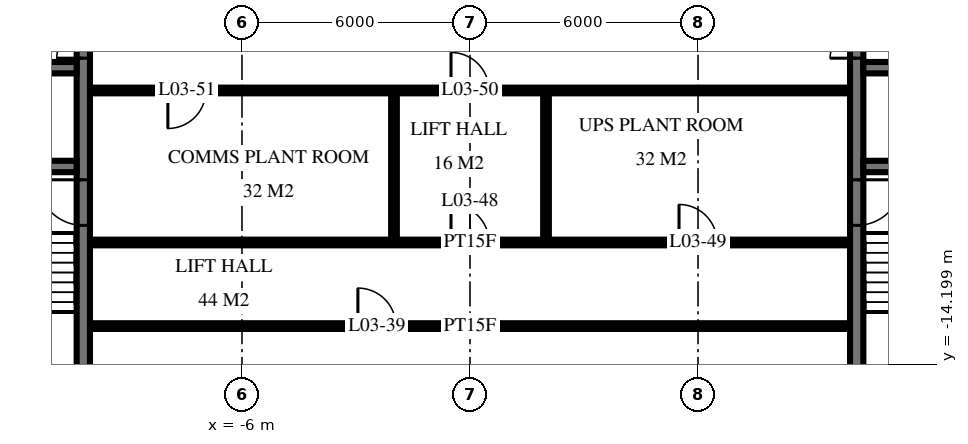
"""IFC4 building model, lengths in metres.
Left out: names, types, materials, properties, quantities, classifications, styles, units other than length and angle.
Written with IfcOpenShell. Run it as: python <this file> out.ifc"""

import sys

from ifc_helpers import new_model, si_unit, direction, frame, frame_2d, origin, place, context, subcontext, project, spatial, rectangle, extrude, element, fill, save


model = new_model("IFC4")
c1 = context("Model", 3, precision=1e-05, world=origin(), true_north=direction((0.0, 1.0)))
c2 = subcontext(c1, "Body", "Model", "MODEL_VIEW")
j1 = project(units=[si_unit("LENGTHUNIT", "METRE"), si_unit("PLANEANGLEUNIT", "RADIAN")], contexts=[c1])
p1 = place(None, origin())
s1 = spatial("IfcSite", under=j1, at=p1, CompositionType="ELEMENT")
p2 = place(p1, origin())
s2 = spatial("IfcBuilding", under=s1, at=p2, CompositionType="ELEMENT")
p3 = place(p2, frame((0.0, 0.0, 18.0)))
s3 = spatial("IfcBuildingStorey", under=s2, at=p3, CompositionType="ELEMENT", Elevation=18.0)
p4 = place(p3, frame((-10.175, -14.55, 0.0), z_axis=(0.0, 0.0, 1.0), x_axis=(0.0, 1.0, 0.0)))
e1 = element("IfcWall", 1, at=p4, inside=s3, PredefinedType="SHEAR", context=c2, shape_type="SweptSolid", body=[
    extrude(rectangle(XDim=14.1, YDim=0.35, at=frame_2d((7.05, 0.0))), origin(), (0.0, 0.0, 1.0), 6.0),
])
p5 = place(p4, frame((8.4, 0.0, 0.0)))
e2 = element("IfcOpeningElement", 2, at=p5, cuts=e1, PredefinedType="OPENING", context=c2, shape_type="SweptSolid", body=[
    extrude(rectangle(XDim=1.4, YDim=2.4, at=frame_2d((0.7, 1.2))), frame((0.0, 0.185, 0.0), z_axis=(0.0, -1.0, 0.0), x_axis=(1.0, 0.0, 0.0)), (0.0, 0.0, 1.0), 0.37),
])
p6 = place(p4, frame((10.0, 0.0, 0.0)))
e3 = element("IfcOpeningElement", 3, at=p6, cuts=e1, PredefinedType="OPENING", context=c2, shape_type="SweptSolid", body=[
    extrude(rectangle(XDim=1.4, YDim=2.4, at=frame_2d((0.7, 1.2))), frame((0.0, 0.185, 0.0), z_axis=(0.0, -1.0, 0.0), x_axis=(1.0, 0.0, 0.0)), (0.0, 0.0, 1.0), 0.37),
])
p7 = place(p4, frame((4.0, 0.0, 0.0)))
e4 = element("IfcOpeningElement", 4, at=p7, cuts=e1, PredefinedType="OPENING", context=c2, shape_type="SweptSolid", body=[
    extrude(rectangle(XDim=1.2, YDim=2.1, at=frame_2d((0.6, 1.05))), frame((0.0, 0.185, 0.0), z_axis=(0.0, -1.0, 0.0), x_axis=(1.0, 0.0, 0.0)), (0.0, 0.0, 1.0), 0.37),
])
p8 = place(p3, frame((-29.05, -6.4, 0.0), z_axis=(0.0, 0.0, 1.0), x_axis=(1.0, 0.0, 0.0)))
e5 = element("IfcWall", 5, at=p8, inside=s3, PredefinedType="SHEAR", context=c2, shape_type="SweptSolid", body=[
    extrude(rectangle(XDim=18.7, YDim=0.3, at=frame_2d((9.35, 0.0))), origin(), (0.0, 0.0, 1.0), 6.0),
])
p9 = place(p8, frame((2.95, 0.0, 0.0)))
e6 = element("IfcOpeningElement", 6, at=p9, cuts=e5, PredefinedType="OPENING", context=c2, shape_type="SweptSolid", body=[
    extrude(rectangle(XDim=1.1, YDim=2.1, at=frame_2d((0.55, 1.05))), frame((0.0, 0.16, 0.0), z_axis=(0.0, -1.0, 0.0), x_axis=(1.0, 0.0, 0.0)), (0.0, 0.0, 1.0), 0.32),
])
p10 = place(p8, frame((0.55, 0.0, 0.0)))
e7 = element("IfcOpeningElement", 7, at=p10, cuts=e5, PredefinedType="OPENING", context=c2, shape_type="SweptSolid", body=[
    extrude(rectangle(XDim=1.1, YDim=2.1, at=frame_2d((0.55, 1.05))), frame((0.0, 0.16, 0.0), z_axis=(0.0, -1.0, 0.0), x_axis=(1.0, 0.0, 0.0)), (0.0, 0.0, 1.0), 0.32),
])
p11 = place(p8, frame((10.8, 0.0, 0.0)))
e8 = element("IfcOpeningElement", 8, at=p11, cuts=e5, PredefinedType="OPENING", context=c2, shape_type="SweptSolid", body=[
    extrude(rectangle(XDim=1.1, YDim=2.1, at=frame_2d((0.55, 1.05))), frame((0.0, 0.16, 0.0), z_axis=(0.0, -1.0, 0.0), x_axis=(1.0, 0.0, 0.0)), (0.0, 0.0, 1.0), 0.32),
])
p12 = place(p8, frame((5.6, 0.0, 0.0)))
e9 = element("IfcOpeningElement", 9, at=p12, cuts=e5, PredefinedType="OPENING", context=c2, shape_type="SweptSolid", body=[
    extrude(rectangle(XDim=1.0, YDim=2.1, at=frame_2d((0.5, 1.05))), frame((0.0, 0.16, 0.0), z_axis=(0.0, -1.0, 0.0), x_axis=(1.0, 0.0, 0.0)), (0.0, 0.0, 1.0), 0.32),
])
p13 = place(p3, frame((-29.05, -9.0, 0.0), z_axis=(0.0, 0.0, 1.0), x_axis=(1.0, 0.0, 0.0)))
e10 = element("IfcWall", 10, at=p13, inside=s3, PredefinedType="SHEAR", context=c2, shape_type="SweptSolid", body=[
    extrude(rectangle(XDim=18.7, YDim=0.3, at=frame_2d((9.35, 0.0))), origin(), (0.0, 0.0, 1.0), 6.0),
])
p14 = place(p13, frame((13.8, 0.0, 0.0)))
e11 = element("IfcOpeningElement", 11, at=p14, cuts=e10, PredefinedType="OPENING", context=c2, shape_type="SweptSolid", body=[
    extrude(rectangle(XDim=1.1, YDim=2.1, at=frame_2d((0.55, 1.05))), frame((0.0, 0.16, 0.0), z_axis=(0.0, -1.0, 0.0), x_axis=(1.0, 0.0, 0.0)), (0.0, 0.0, 1.0), 0.32),
])
p15 = place(p3, frame((10.175, -14.55, 0.0), z_axis=(0.0, 0.0, 1.0), x_axis=(0.0, 1.0, 0.0)))
e12 = element("IfcWall", 12, at=p15, inside=s3, PredefinedType="SHEAR", context=c2, shape_type="SweptSolid", body=[
    extrude(rectangle(XDim=14.1, YDim=0.35, at=frame_2d((7.05, 0.0))), origin(), (0.0, 0.0, 1.0), 6.0),
])
p16 = place(p15, frame((8.4, 0.0, 0.0)))
e13 = element("IfcOpeningElement", 13, at=p16, cuts=e12, PredefinedType="OPENING", context=c2, shape_type="SweptSolid", body=[
    extrude(rectangle(XDim=1.4, YDim=2.4, at=frame_2d((0.7, 1.2))), frame((0.0, 0.185, 0.0), z_axis=(0.0, -1.0, 0.0), x_axis=(1.0, 0.0, 0.0)), (0.0, 0.0, 1.0), 0.37),
])
p17 = place(p15, frame((10.0, 0.0, 0.0)))
e14 = element("IfcOpeningElement", 14, at=p17, cuts=e12, PredefinedType="OPENING", context=c2, shape_type="SweptSolid", body=[
    extrude(rectangle(XDim=1.4, YDim=2.4, at=frame_2d((0.7, 1.2))), frame((0.0, 0.185, 0.0), z_axis=(0.0, -1.0, 0.0), x_axis=(1.0, 0.0, 0.0)), (0.0, 0.0, 1.0), 0.37),
])
p18 = place(p15, frame((4.0, 0.0, 0.0)))
e15 = element("IfcOpeningElement", 15, at=p18, cuts=e12, PredefinedType="OPENING", context=c2, shape_type="SweptSolid", body=[
    extrude(rectangle(XDim=1.2, YDim=2.1, at=frame_2d((0.6, 1.05))), frame((0.0, 0.185, 0.0), z_axis=(0.0, -1.0, 0.0), x_axis=(1.0, 0.0, 0.0)), (0.0, 0.0, 1.0), 0.37),
])
p19 = place(p3, frame((10.35, -6.4, 0.0), z_axis=(0.0, 0.0, 1.0), x_axis=(1.0, 0.0, 0.0)))
e16 = element("IfcWall", 16, at=p19, inside=s3, PredefinedType="SHEAR", context=c2, shape_type="SweptSolid", body=[
    extrude(rectangle(XDim=18.7, YDim=0.3, at=frame_2d((9.35, 0.0))), origin(), (0.0, 0.0, 1.0), 6.0),
])
p20 = place(p19, frame((14.65, 0.0, 0.0)))
e17 = element("IfcOpeningElement", 17, at=p20, cuts=e16, PredefinedType="OPENING", context=c2, shape_type="SweptSolid", body=[
    extrude(rectangle(XDim=1.1, YDim=2.1, at=frame_2d((0.55, 1.05))), frame((0.0, 0.16, 0.0), z_axis=(0.0, -1.0, 0.0), x_axis=(1.0, 0.0, 0.0)), (0.0, 0.0, 1.0), 0.32),
])
p21 = place(p19, frame((17.05, 0.0, 0.0)))
e18 = element("IfcOpeningElement", 18, at=p21, cuts=e16, PredefinedType="OPENING", context=c2, shape_type="SweptSolid", body=[
    extrude(rectangle(XDim=1.1, YDim=2.1, at=frame_2d((0.55, 1.05))), frame((0.0, 0.16, 0.0), z_axis=(0.0, -1.0, 0.0), x_axis=(1.0, 0.0, 0.0)), (0.0, 0.0, 1.0), 0.32),
])
p22 = place(p19, frame((6.8, 0.0, 0.0)))
e19 = element("IfcOpeningElement", 19, at=p22, cuts=e16, PredefinedType="OPENING", context=c2, shape_type="SweptSolid", body=[
    extrude(rectangle(XDim=1.1, YDim=2.1, at=frame_2d((0.55, 1.05))), frame((0.0, 0.16, 0.0), z_axis=(0.0, -1.0, 0.0), x_axis=(1.0, 0.0, 0.0)), (0.0, 0.0, 1.0), 0.32),
])
p23 = place(p19, frame((12.1, 0.0, 0.0)))
e20 = element("IfcOpeningElement", 20, at=p23, cuts=e16, PredefinedType="OPENING", context=c2, shape_type="SweptSolid", body=[
    extrude(rectangle(XDim=1.0, YDim=2.1, at=frame_2d((0.5, 1.05))), frame((0.0, 0.16, 0.0), z_axis=(0.0, -1.0, 0.0), x_axis=(1.0, 0.0, 0.0)), (0.0, 0.0, 1.0), 0.32),
])
p24 = place(p3, frame((10.35, -9.0, 0.0), z_axis=(0.0, 0.0, 1.0), x_axis=(1.0, 0.0, 0.0)))
e21 = element("IfcWall", 21, at=p24, inside=s3, PredefinedType="SHEAR", context=c2, shape_type="SweptSolid", body=[
    extrude(rectangle(XDim=18.7, YDim=0.3, at=frame_2d((9.35, 0.0))), origin(), (0.0, 0.0, 1.0), 6.0),
])
p25 = place(p24, frame((3.8, 0.0, 0.0)))
e22 = element("IfcOpeningElement", 22, at=p25, cuts=e21, PredefinedType="OPENING", context=c2, shape_type="SweptSolid", body=[
    extrude(rectangle(XDim=1.1, YDim=2.1, at=frame_2d((0.55, 1.05))), frame((0.0, 0.16, 0.0), z_axis=(0.0, -1.0, 0.0), x_axis=(1.0, 0.0, 0.0)), (0.0, 0.0, 1.0), 0.32),
])
for number, where, z_axis, x_axis in (
    (23, (2.0, -11.0, 0.0), (0.0, 0.0, 1.0), (0.0, 1.0, 0.0)),
    (24, (-2.0, -11.0, 0.0), (0.0, 0.0, 1.0), (0.0, 1.0, 0.0)),
):
    element("IfcWall", number, at=place(p3, frame(where, z_axis=z_axis, x_axis=x_axis)), inside=s3, PredefinedType="PARTITIONING", context=c2, shape_type="SweptSolid", body=[
        extrude(rectangle(XDim=4.0, YDim=0.15, at=frame_2d((2.0, 0.0))), origin(), (0.0, 0.0, 1.0), 5.55),
    ])
p26 = place(p3, frame((-9.95, -13.2, 0.0), z_axis=(0.0, 0.0, 1.0), x_axis=(1.0, 0.0, 0.0)))
e25 = element("IfcWall", 25, at=p26, inside=s3, PredefinedType="PARTITIONING", context=c2, shape_type="SweptSolid", body=[
    extrude(rectangle(XDim=19.9, YDim=0.15, at=frame_2d((9.95, 0.0))), origin(), (0.0, 0.0, 1.0), 5.55),
])
p27 = place(p26, frame((7.0, 0.0, 0.0)))
e26 = element("IfcOpeningElement", 26, at=p27, cuts=e25, PredefinedType="OPENING", context=c2, shape_type="SweptSolid", body=[
    extrude(rectangle(XDim=1.0, YDim=2.1, at=frame_2d((0.5, 1.05))), frame((0.0, 0.085, 0.0), z_axis=(0.0, -1.0, 0.0), x_axis=(1.0, 0.0, 0.0)), (0.0, 0.0, 1.0), 0.17),
])
p28 = place(p3, frame((-9.95, -11.0, 0.0), z_axis=(0.0, 0.0, 1.0), x_axis=(1.0, 0.0, 0.0)))
e27 = element("IfcWall", 27, at=p28, inside=s3, PredefinedType="PARTITIONING", context=c2, shape_type="SweptSolid", body=[
    extrude(rectangle(XDim=19.9, YDim=0.15, at=frame_2d((9.95, 0.0))), origin(), (0.0, 0.0, 1.0), 5.55),
])
p29 = place(p28, frame((9.45, 0.0, 0.0)))
e28 = element("IfcOpeningElement", 28, at=p29, cuts=e27, PredefinedType="OPENING", context=c2, shape_type="SweptSolid", body=[
    extrude(rectangle(XDim=1.0, YDim=2.1, at=frame_2d((0.5, 1.05))), frame((0.0, 0.085, 0.0), z_axis=(0.0, -1.0, 0.0), x_axis=(1.0, 0.0, 0.0)), (0.0, 0.0, 1.0), 0.17),
])
p30 = place(p28, frame((15.45, 0.0, 0.0)))
e29 = element("IfcOpeningElement", 29, at=p30, cuts=e27, PredefinedType="OPENING", context=c2, shape_type="SweptSolid", body=[
    extrude(rectangle(XDim=1.0, YDim=2.1, at=frame_2d((0.5, 1.05))), frame((0.0, 0.085, 0.0), z_axis=(0.0, -1.0, 0.0), x_axis=(1.0, 0.0, 0.0)), (0.0, 0.0, 1.0), 0.17),
])
p31 = place(p3, frame((-9.95, -7.0, 0.0), z_axis=(0.0, 0.0, 1.0), x_axis=(1.0, 0.0, 0.0)))
e30 = element("IfcWall", 30, at=p31, inside=s3, PredefinedType="PARTITIONING", context=c2, shape_type="SweptSolid", body=[
    extrude(rectangle(XDim=19.9, YDim=0.15, at=frame_2d((9.95, 0.0))), origin(), (0.0, 0.0, 1.0), 5.55),
])
p32 = place(p31, frame((9.45, 0.0, 0.0)))
e31 = element("IfcOpeningElement", 31, at=p32, cuts=e30, PredefinedType="OPENING", context=c2, shape_type="SweptSolid", body=[
    extrude(rectangle(XDim=1.0, YDim=2.1, at=frame_2d((0.5, 1.05))), frame((0.0, 0.085, 0.0), z_axis=(0.0, -1.0, 0.0), x_axis=(1.0, 0.0, 0.0)), (0.0, 0.0, 1.0), 0.17),
])
p33 = place(p31, frame((2.0, 0.0, 0.0)))
e32 = element("IfcOpeningElement", 32, at=p33, cuts=e30, PredefinedType="OPENING", context=c2, shape_type="SweptSolid", body=[
    extrude(rectangle(XDim=1.0, YDim=2.1, at=frame_2d((0.5, 1.05))), frame((0.0, 0.085, 0.0), z_axis=(0.0, -1.0, 0.0), x_axis=(1.0, 0.0, 0.0)), (0.0, 0.0, 1.0), 0.17),
])
p34 = place(p5, origin())
e33 = element("IfcDoor", 33, at=p34, inside=s3, OperationType="DOUBLE_DOOR_SINGLE_SWING", PredefinedType="DOOR", context=c2, shape_type="SweptSolid", body=[
    extrude(rectangle(XDim=1.4, YDim=2.4, at=frame_2d((0.7, 1.2))), frame((0.0, 0.025, 0.0), z_axis=(0.0, -1.0, 0.0), x_axis=(1.0, 0.0, 0.0)), (0.0, 0.0, 1.0), 0.05),
])
fill(e2, e33)
p35 = place(p7, origin())
e34 = element("IfcDoor", 34, at=p35, inside=s3, OperationType="SINGLE_SWING_LEFT", PredefinedType="DOOR", context=c2, shape_type="SweptSolid", body=[
    extrude(rectangle(XDim=1.2, YDim=2.1, at=frame_2d((0.6, 1.05))), frame((0.0, 0.025, 0.0), z_axis=(0.0, -1.0, 0.0), x_axis=(1.0, 0.0, 0.0)), (0.0, 0.0, 1.0), 0.05),
])
fill(e4, e34)
p36 = place(p16, origin())
e35 = element("IfcDoor", 35, at=p36, inside=s3, OperationType="DOUBLE_DOOR_SINGLE_SWING", PredefinedType="DOOR", context=c2, shape_type="SweptSolid", body=[
    extrude(rectangle(XDim=1.4, YDim=2.4, at=frame_2d((0.7, 1.2))), frame((0.0, 0.025, 0.0), z_axis=(0.0, -1.0, 0.0), x_axis=(1.0, 0.0, 0.0)), (0.0, 0.0, 1.0), 0.05),
])
fill(e13, e35)
p37 = place(p18, frame((0.6, 0.0, 0.0), z_axis=(0.0, 0.0, 1.0), x_axis=(-1.0, 0.0, 0.0)))
e36 = element("IfcDoor", 36, at=p37, inside=s3, OperationType="SINGLE_SWING_RIGHT", PredefinedType="DOOR", context=c2, shape_type="SweptSolid", body=[
    extrude(rectangle(XDim=1.2, YDim=2.1, at=frame_2d((0.0, 1.05))), frame((0.0, -0.025, 0.0), z_axis=(0.0, 1.0, 0.0), x_axis=(-1.0, 0.0, 0.0)), (0.0, 0.0, 1.0), 0.05),
])
fill(e15, e36)
p38 = place(p27, origin())
e37 = element("IfcDoor", 37, at=p38, inside=s3, OperationType="SINGLE_SWING_RIGHT", PredefinedType="DOOR", context=c2, shape_type="SweptSolid", body=[
    extrude(rectangle(XDim=1.0, YDim=2.1, at=frame_2d((0.5, 1.05))), frame((0.0, 0.025, 0.0), z_axis=(0.0, -1.0, 0.0), x_axis=(1.0, 0.0, 0.0)), (0.0, 0.0, 1.0), 0.05),
])
fill(e26, e37)
p39 = place(p29, origin())
e38 = element("IfcDoor", 38, at=p39, inside=s3, OperationType="SINGLE_SWING_RIGHT", PredefinedType="DOOR", context=c2, shape_type="SweptSolid", body=[
    extrude(rectangle(XDim=1.0, YDim=2.1, at=frame_2d((0.5, 1.05))), frame((0.0, 0.025, 0.0), z_axis=(0.0, -1.0, 0.0), x_axis=(1.0, 0.0, 0.0)), (0.0, 0.0, 1.0), 0.05),
])
fill(e28, e38)
p40 = place(p30, origin())
e39 = element("IfcDoor", 39, at=p40, inside=s3, OperationType="SINGLE_SWING_RIGHT", PredefinedType="DOOR", context=c2, shape_type="SweptSolid", body=[
    extrude(rectangle(XDim=1.0, YDim=2.1, at=frame_2d((0.5, 1.05))), frame((0.0, 0.025, 0.0), z_axis=(0.0, -1.0, 0.0), x_axis=(1.0, 0.0, 0.0)), (0.0, 0.0, 1.0), 0.05),
])
fill(e29, e39)
p41 = place(p32, origin())
e40 = element("IfcDoor", 40, at=p41, inside=s3, OperationType="SINGLE_SWING_RIGHT", PredefinedType="DOOR", context=c2, shape_type="SweptSolid", body=[
    extrude(rectangle(XDim=1.0, YDim=2.1, at=frame_2d((0.5, 1.05))), frame((0.0, 0.025, 0.0), z_axis=(0.0, -1.0, 0.0), x_axis=(1.0, 0.0, 0.0)), (0.0, 0.0, 1.0), 0.05),
])
fill(e31, e40)
p42 = place(p33, frame((0.5, 0.0, 0.0), z_axis=(0.0, 0.0, 1.0), x_axis=(-1.0, 0.0, 0.0)))
e41 = element("IfcDoor", 41, at=p42, inside=s3, OperationType="SINGLE_SWING_LEFT", PredefinedType="DOOR", context=c2, shape_type="SweptSolid", body=[
    extrude(rectangle(XDim=1.0, YDim=2.1, at=frame_2d((0.0, 1.05))), frame((0.0, -0.025, 0.0), z_axis=(0.0, 1.0, 0.0), x_axis=(-1.0, 0.0, 0.0)), (0.0, 0.0, 1.0), 0.05),
])
fill(e32, e41)
save(model, sys.argv[1])
